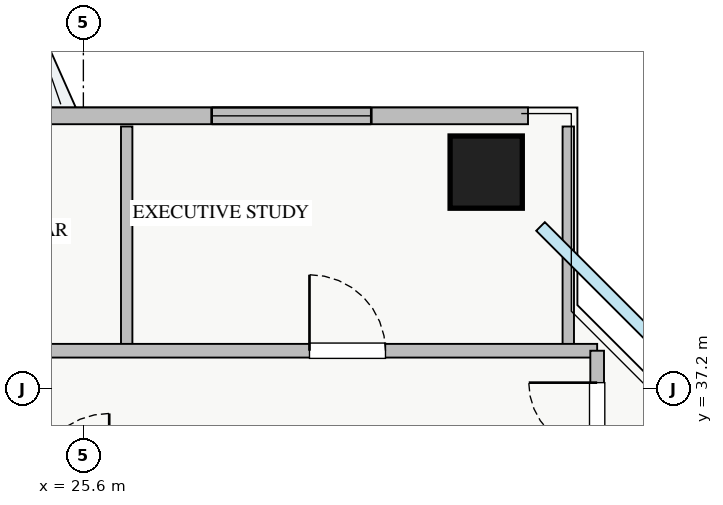
"""IFC4 building model, lengths in metres.
Left out: names, types, materials, properties, quantities, classifications, styles, units other than length and angle.
Written with IfcOpenShell. Run it as: python <this file> out.ifc"""

import sys

from ifc_helpers import new_model, si_unit, direction, frame, frame_2d, origin, origin_2d, place, context, subcontext, project, spatial, rectangle, extrude, source, transform, mapped, element, fill, save


model = new_model("IFC4")
c1 = context("Model", 3, precision=1e-05, world=origin(), true_north=direction((0.0, 1.0)))
c2 = subcontext(c1, "Body", "Model", "MODEL_VIEW")
j1 = project(units=[si_unit("LENGTHUNIT", "METRE"), si_unit("PLANEANGLEUNIT", "RADIAN")], contexts=[c1])
p1 = place(None, origin())
s1 = spatial("IfcSite", under=j1, at=p1, CompositionType="ELEMENT")
p2 = place(p1, origin())
s2 = spatial("IfcBuilding", under=s1, at=p2, CompositionType="ELEMENT")
p3 = place(p2, frame((0.0, 0.0, 150.25)))
s3 = spatial("IfcBuildingStorey", under=s2, at=p3, CompositionType="ELEMENT", Elevation=150.25)
m1 = source(origin(), c2, "Body", "SweptSolid", [
    extrude(rectangle(XDim=0.95, YDim=0.95, at=origin_2d()), origin(), (0.0, 0.0, 1.0), 3.25),
])
p4 = place(p3, frame((30.9, 40.05, 0.0), z_axis=(0.0, 0.0, 1.0), x_axis=(1.0, 0.0, 0.0)))
e1 = element("IfcColumn", 1, at=p4, inside=s3, PredefinedType="COLUMN", context=c2, shape_type="MappedRepresentation", body=[
    mapped(m1, transform((0.0, 0.0, 0.0), x_axis=(1.0, 0.0, 0.0), y_axis=(0.0, 1.0, 0.0), z_axis=(0.0, 0.0, 1.0), scale=1.0)),
])
p5 = place(p3, frame((6.55, 40.79, 0.0), z_axis=(0.0, 0.0, 1.0), x_axis=(1.0, 0.0, 0.0)))
e2 = element("IfcWall", 2, at=p5, inside=s3, PredefinedType="STANDARD", context=c2, shape_type="SweptSolid", body=[
    extrude(rectangle(XDim=24.9, YDim=0.22, at=frame_2d((12.45, 0.0))), origin(), (0.0, 0.0, 1.0), 2.61),
])
p6 = place(p5, frame((13.3, 0.0, 0.0)))
e3 = element("IfcOpeningElement", 3, at=p6, cuts=e2, PredefinedType="OPENING", context=c2, shape_type="SweptSolid", body=[
    extrude(rectangle(XDim=1.2, YDim=2.1, at=frame_2d((0.6, 1.05))), frame((0.0, 0.12, 0.0), z_axis=(0.0, -1.0, 0.0), x_axis=(1.0, 0.0, 0.0)), (0.0, 0.0, 1.0), 0.24),
])
p7 = place(p5, frame((0.357, 0.0, 0.9)))
e4 = element("IfcOpeningElement", 4, at=p7, cuts=e2, PredefinedType="OPENING", context=c2, shape_type="SweptSolid", body=[
    extrude(rectangle(XDim=1.5, YDim=1.5, at=frame_2d((0.75, 0.75))), frame((0.0, 0.12, 0.0), z_axis=(0.0, -1.0, 0.0), x_axis=(1.0, 0.0, 0.0)), (0.0, 0.0, 1.0), 0.24),
])
p8 = place(p5, frame((9.77, 0.0, 0.9)))
e5 = element("IfcOpeningElement", 5, at=p8, cuts=e2, PredefinedType="OPENING", context=c2, shape_type="SweptSolid", body=[
    extrude(rectangle(XDim=1.8, YDim=1.5, at=frame_2d((0.9, 0.75))), frame((0.0, 0.12, 0.0), z_axis=(0.0, -1.0, 0.0), x_axis=(1.0, 0.0, 0.0)), (0.0, 0.0, 1.0), 0.24),
])
p9 = place(p5, frame((14.813, 0.0, 0.9)))
e6 = element("IfcOpeningElement", 6, at=p9, cuts=e2, PredefinedType="OPENING", context=c2, shape_type="SweptSolid", body=[
    extrude(rectangle(XDim=1.5, YDim=1.45, at=frame_2d((0.75, 0.725))), frame((0.0, 0.12, 0.0), z_axis=(0.0, -1.0, 0.0), x_axis=(1.0, 0.0, 0.0)), (0.0, 0.0, 1.0), 0.24),
])
p10 = place(p5, frame((20.738, 0.0, 0.9)))
e7 = element("IfcOpeningElement", 7, at=p10, cuts=e2, PredefinedType="OPENING", context=c2, shape_type="SweptSolid", body=[
    extrude(rectangle(XDim=2.1, YDim=1.48, at=frame_2d((1.05, 0.74))), frame((0.0, 0.12, 0.0), z_axis=(0.0, -1.0, 0.0), x_axis=(1.0, 0.0, 0.0)), (0.0, 0.0, 1.0), 0.24),
])
p11 = place(p5, frame((4.136, 0.0, 0.9)))
e8 = element("IfcOpeningElement", 8, at=p11, cuts=e2, PredefinedType="OPENING", context=c2, shape_type="SweptSolid", body=[
    extrude(rectangle(XDim=2.4, YDim=1.5, at=frame_2d((1.2, 0.75))), frame((0.0, 0.12, 0.0), z_axis=(0.0, -1.0, 0.0), x_axis=(1.0, 0.0, 0.0)), (0.0, 0.0, 1.0), 0.24),
])
for number, where, z_axis, x_axis in (
    (9, (26.17, 37.7, 0.0), (0.0, 0.0, 1.0), (0.0, 1.0, 0.0)),
    (10, (31.98, 37.7, 0.0), (0.0, 0.0, 1.0), (0.0, 1.0, 0.0)),
):
    element("IfcWall", number, at=place(p3, frame(where, z_axis=z_axis, x_axis=x_axis)), inside=s3, PredefinedType="PARTITIONING", context=c2, shape_type="SweptSolid", body=[
        extrude(rectangle(XDim=2.95, YDim=0.15, at=frame_2d((1.475, 0.0))), origin(), (0.0, 0.0, 1.0), 3.07),
    ])
p12 = place(p3, frame((8.75, 37.7, 0.0), z_axis=(0.0, 0.0, 1.0), x_axis=(1.0, 0.0, 0.0)))
e11 = element("IfcWall", 11, at=p12, inside=s3, PredefinedType="PARTITIONING", context=c2, shape_type="SweptSolid", body=[
    extrude(rectangle(XDim=23.61, YDim=0.18, at=frame_2d((11.805, 0.0))), origin(), (0.0, 0.0, 1.0), 3.07),
])
p13 = place(p12, frame((2.795, 0.0, 0.0)))
e12 = element("IfcOpeningElement", 12, at=p13, cuts=e11, PredefinedType="OPENING", context=c2, shape_type="SweptSolid", body=[
    extrude(rectangle(XDim=1.0, YDim=2.05, at=frame_2d((0.5, 1.025))), frame((0.0, 0.1, 0.0), z_axis=(0.0, -1.0, 0.0), x_axis=(1.0, 0.0, 0.0)), (0.0, 0.0, 1.0), 0.2),
])
p14 = place(p12, frame((7.97, 0.0, 0.0)))
e13 = element("IfcOpeningElement", 13, at=p14, cuts=e11, PredefinedType="OPENING", context=c2, shape_type="SweptSolid", body=[
    extrude(rectangle(XDim=1.0, YDim=2.05, at=frame_2d((0.5, 1.025))), frame((0.0, 0.1, 0.0), z_axis=(0.0, -1.0, 0.0), x_axis=(1.0, 0.0, 0.0)), (0.0, 0.0, 1.0), 0.2),
])
p15 = place(p12, frame((13.385, 0.0, 0.0)))
e14 = element("IfcOpeningElement", 14, at=p15, cuts=e11, PredefinedType="OPENING", context=c2, shape_type="SweptSolid", body=[
    extrude(rectangle(XDim=1.0, YDim=2.05, at=frame_2d((0.5, 1.025))), frame((0.0, 0.1, 0.0), z_axis=(0.0, -1.0, 0.0), x_axis=(1.0, 0.0, 0.0)), (0.0, 0.0, 1.0), 0.2),
])
p16 = place(p12, frame((19.825, 0.0, 0.0)))
e15 = element("IfcOpeningElement", 15, at=p16, cuts=e11, PredefinedType="OPENING", context=c2, shape_type="SweptSolid", body=[
    extrude(rectangle(XDim=1.0, YDim=2.05, at=frame_2d((0.5, 1.025))), frame((0.0, 0.1, 0.0), z_axis=(0.0, -1.0, 0.0), x_axis=(1.0, 0.0, 0.0)), (0.0, 0.0, 1.0), 0.2),
])
p17 = place(p3, frame((32.36, 8.3, 0.0), z_axis=(0.0, 0.0, 1.0), x_axis=(0.0, 1.0, 0.0)))
e16 = element("IfcWall", 16, at=p17, inside=s3, PredefinedType="PARTITIONING", context=c2, shape_type="SweptSolid", body=[
    extrude(rectangle(XDim=29.4, YDim=0.18, at=frame_2d((14.7, 0.0))), origin(), (0.0, 0.0, 1.0), 3.07),
])
p18 = place(p17, frame((28.08, 0.0, 0.0)))
e17 = element("IfcOpeningElement", 17, at=p18, cuts=e16, PredefinedType="OPENING", context=c2, shape_type="SweptSolid", body=[
    extrude(rectangle(XDim=0.9, YDim=2.05, at=frame_2d((0.45, 1.025))), frame((0.0, 0.1, 0.0), z_axis=(0.0, -1.0, 0.0), x_axis=(1.0, 0.0, 0.0)), (0.0, 0.0, 1.0), 0.2),
])
p19 = place(p17, frame((0.42, 0.0, 0.0)))
e18 = element("IfcOpeningElement", 18, at=p19, cuts=e16, PredefinedType="OPENING", context=c2, shape_type="SweptSolid", body=[
    extrude(rectangle(XDim=0.9, YDim=2.05, at=frame_2d((0.45, 1.025))), frame((0.0, 0.1, 0.0), z_axis=(0.0, -1.0, 0.0), x_axis=(1.0, 0.0, 0.0)), (0.0, 0.0, 1.0), 0.2),
])
p20 = place(p17, frame((8.05, 0.0, 0.0)))
e19 = element("IfcOpeningElement", 19, at=p20, cuts=e16, PredefinedType="OPENING", context=c2, shape_type="SweptSolid", body=[
    extrude(rectangle(XDim=1.0, YDim=2.05, at=frame_2d((0.5, 1.025))), frame((0.0, 0.1, 0.0), z_axis=(0.0, -1.0, 0.0), x_axis=(1.0, 0.0, 0.0)), (0.0, 0.0, 1.0), 0.2),
])
p21 = place(p17, frame((18.01, 0.0, 0.0)))
e20 = element("IfcOpeningElement", 20, at=p21, cuts=e16, PredefinedType="OPENING", context=c2, shape_type="SweptSolid", body=[
    extrude(rectangle(XDim=1.0, YDim=2.05, at=frame_2d((0.5, 1.025))), frame((0.0, 0.1, 0.0), z_axis=(0.0, -1.0, 0.0), x_axis=(1.0, 0.0, 0.0)), (0.0, 0.0, 1.0), 0.2),
])
m2 = source(origin(), c2, "Body", "SweptSolid", [
    extrude(rectangle(XDim=2.1, YDim=1.48, at=frame_2d((1.05, 0.74))), frame((0.0, 0.03, 0.0), z_axis=(0.0, -1.0, 0.0), x_axis=(1.0, 0.0, 0.0)), (0.0, 0.0, 1.0), 0.06),
])
p22 = place(p10, origin())
e21 = element("IfcWindow", 21, at=p22, inside=s3, PartitioningType="TRIPLE_PANEL_VERTICAL", PredefinedType="WINDOW", context=c2, shape_type="MappedRepresentation", body=[
    mapped(m2, transform((0.0, 0.0, 0.0), x_axis=(1.0, 0.0, 0.0), y_axis=(0.0, 1.0, 0.0), z_axis=(0.0, 0.0, 1.0), scale=1.0)),
])
fill(e7, e21)
m3 = source(origin(), c2, "Body", "SweptSolid", [
    extrude(rectangle(XDim=1.0, YDim=2.05, at=frame_2d((0.5, 1.025))), frame((0.0, 0.025, 0.0), z_axis=(0.0, -1.0, 0.0), x_axis=(1.0, 0.0, 0.0)), (0.0, 0.0, 1.0), 0.05),
])
p23 = place(p16, origin())
e22 = element("IfcDoor", 22, at=p23, inside=s3, OperationType="SINGLE_SWING_LEFT", PredefinedType="DOOR", context=c2, shape_type="MappedRepresentation", body=[
    mapped(m3, transform((0.0, 0.0, 0.0), x_axis=(1.0, 0.0, 0.0), y_axis=(0.0, 1.0, 0.0), z_axis=(0.0, 0.0, 1.0), scale=1.0)),
])
fill(e15, e22)
m4 = source(origin(), c2, "Body", "SweptSolid", [
    extrude(rectangle(XDim=0.9, YDim=2.05, at=frame_2d((0.45, 1.025))), frame((0.0, 0.025, 0.0), z_axis=(0.0, -1.0, 0.0), x_axis=(1.0, 0.0, 0.0)), (0.0, 0.0, 1.0), 0.05),
])
p24 = place(p18, origin())
e23 = element("IfcDoor", 23, at=p24, inside=s3, OperationType="SINGLE_SWING_RIGHT", PredefinedType="DOOR", context=c2, shape_type="MappedRepresentation", body=[
    mapped(m4, transform((0.0, 0.0, 0.0), x_axis=(1.0, 0.0, 0.0), y_axis=(0.0, 1.0, 0.0), z_axis=(0.0, 0.0, 1.0), scale=1.0)),
])
fill(e17, e23)
save(model, sys.argv[1])
